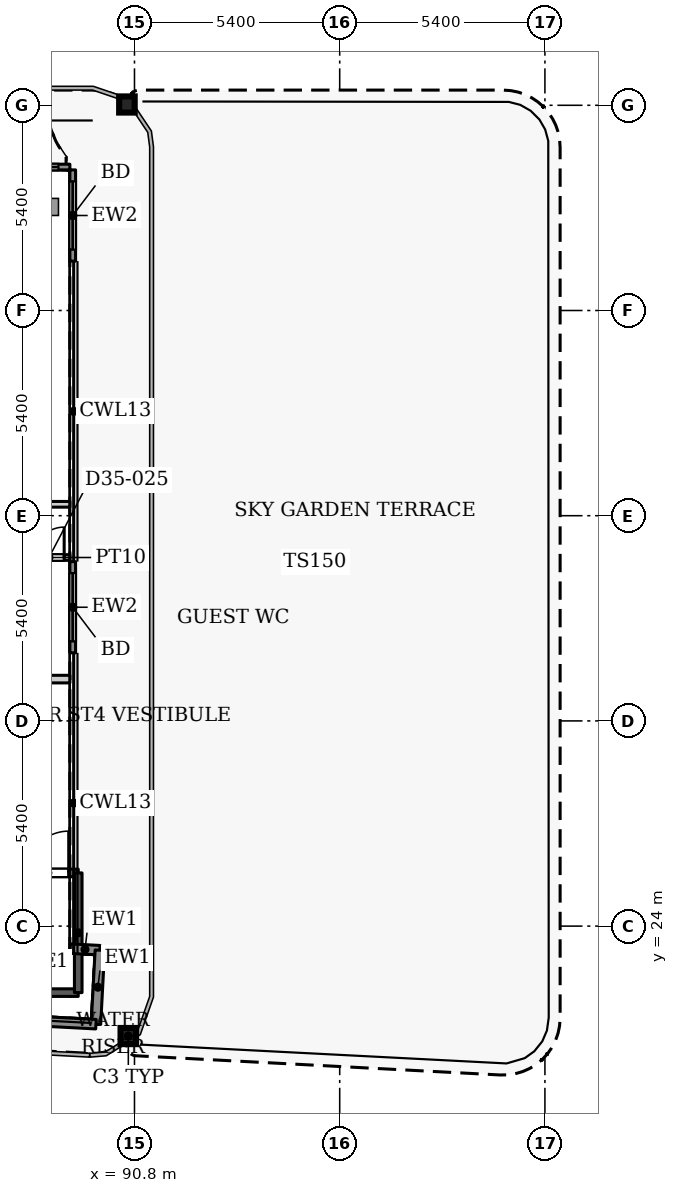
"""IFC4 building model, lengths in metres.
Left out: names, types, materials, properties, quantities, classifications, styles, units other than length and angle.
Written with IfcOpenShell. Run it as: python <this file> out.ifc"""

import sys

from ifc_helpers import new_model, si_unit, direction, frame, frame_2d, origin, origin_2d, place, context, subcontext, project, spatial, rectangle, i_section, extrude, source, transform, mapped, element, fill, save


model = new_model("IFC4")
c1 = context("Model", 3, precision=1e-05, world=origin(), true_north=direction((0.0, 1.0)))
c2 = subcontext(c1, "Body", "Model", "MODEL_VIEW")
j1 = project(units=[si_unit("LENGTHUNIT", "METRE"), si_unit("PLANEANGLEUNIT", "RADIAN")], contexts=[c1])
p1 = place(None, origin())
s1 = spatial("IfcSite", under=j1, at=p1, CompositionType="ELEMENT")
p2 = place(p1, origin())
s2 = spatial("IfcBuilding", under=s1, at=p2, CompositionType="ELEMENT")
p3 = place(p2, frame((0.0, 0.0, 152.6)))
s3 = spatial("IfcBuildingStorey", under=s2, at=p3, CompositionType="ELEMENT", Elevation=152.6)
for number, where, z_axis, x_axis in (
    (1, (90.638, 21.107, 0.0), (0.0, 0.0, 1.0), (1.0, 0.0, 0.0)),
    (2, (90.601, 45.621, 0.0), (0.0, 0.0, 1.0), (1.0, 0.0, 0.0)),
):
    element("IfcColumn", number, at=place(p3, frame(where, z_axis=z_axis, x_axis=x_axis)), inside=s3, PredefinedType="COLUMN", context=c2, shape_type="SweptSolid", body=[
        extrude(i_section(OverallWidth=0.409, OverallDepth=0.425, WebThickness=0.033, FlangeThickness=0.052, FilletRadius=0.013, at=origin_2d()), origin(), (0.0, 0.0, 1.0), 3.9),
    ])
p4 = place(p3, frame((86.7, 43.975, 0.0), z_axis=(0.0, 0.0, 1.0), x_axis=(1.0, 0.0, 0.0)))
e3 = element("IfcWall", 3, at=p4, inside=s3, PredefinedType="SOLIDWALL", context=c2, shape_type="SweptSolid", body=[
    extrude(rectangle(XDim=2.4, YDim=0.15, at=frame_2d((1.2, 0.0))), origin(), (0.0, 0.0, 1.0), 3.75),
])
p5 = place(p4, frame((0.3, 0.0, 0.0)))
e4 = element("IfcOpeningElement", 4, at=p5, cuts=e3, PredefinedType="OPENING", context=c2, shape_type="SweptSolid", body=[
    extrude(rectangle(XDim=1.8, YDim=2.4, at=frame_2d((0.9, 1.2))), frame((0.0, 0.085, 0.0), z_axis=(0.0, -1.0, 0.0), x_axis=(1.0, 0.0, 0.0)), (0.0, 0.0, 1.0), 0.17),
])
p6 = place(p3, frame((89.175, 43.9, 0.0), z_axis=(0.0, 0.0, 1.0), x_axis=(0.0, -1.0, 0.0)))
e5 = element("IfcWall", 5, at=p6, inside=s3, PredefinedType="SOLIDWALL", context=c2, shape_type="SweptSolid", body=[
    extrude(rectangle(XDim=2.4, YDim=0.15, at=frame_2d((1.2, 0.0))), origin(), (0.0, 0.0, 1.0), 3.75),
])
p7 = place(p6, frame((0.3, 0.0, 0.0)))
e6 = element("IfcOpeningElement", 6, at=p7, cuts=e5, PredefinedType="OPENING", context=c2, shape_type="SweptSolid", body=[
    extrude(rectangle(XDim=1.8, YDim=2.4, at=frame_2d((0.9, 1.2))), frame((0.0, 0.085, 0.0), z_axis=(0.0, -1.0, 0.0), x_axis=(1.0, 0.0, 0.0)), (0.0, 0.0, 1.0), 0.17),
])
p8 = place(p3, frame((89.175, 33.591, 0.0), z_axis=(0.0, 0.0, 1.0), x_axis=(0.0, -1.0, 0.0)))
e7 = element("IfcWall", 7, at=p8, inside=s3, PredefinedType="SOLIDWALL", context=c2, shape_type="SweptSolid", body=[
    extrude(rectangle(XDim=2.4, YDim=0.15, at=frame_2d((1.2, 0.0))), origin(), (0.0, 0.0, 1.0), 3.75),
])
p9 = place(p8, frame((0.3, 0.0, 0.0)))
e8 = element("IfcOpeningElement", 8, at=p9, cuts=e7, PredefinedType="OPENING", context=c2, shape_type="SweptSolid", body=[
    extrude(rectangle(XDim=1.8, YDim=2.4, at=frame_2d((0.9, 1.2))), frame((0.0, 0.085, 0.0), z_axis=(0.0, -1.0, 0.0), x_axis=(1.0, 0.0, 0.0)), (0.0, 0.0, 1.0), 0.17),
])
p10 = place(p3, frame((89.107, 23.408, 0.0), z_axis=(0.0, 0.0, 1.0), x_axis=(0.998561284263, -0.053622398031, 0.0)))
e9 = element("IfcWall", 9, at=p10, inside=s3, PredefinedType="SOLIDWALL", context=c2, shape_type="SweptSolid", body=[
    extrude(rectangle(XDim=0.783, YDim=0.25, at=frame_2d((0.392, 0.0))), origin(), (0.0, 0.0, 1.0), 3.75),
])
p11 = place(p3, frame((89.889, 23.366, 0.0), z_axis=(0.0, 0.0, 1.0), x_axis=(-0.052841433274, -0.998602915542, 0.0)))
e10 = element("IfcWall", 10, at=p11, inside=s3, PredefinedType="SOLIDWALL", context=c2, shape_type="SweptSolid", body=[
    extrude(rectangle(XDim=1.95, YDim=0.25, at=frame_2d((0.975, 0.0))), origin(), (0.0, 0.0, 1.0), 3.75),
])
p12 = place(p3, frame((89.786, 21.419, 0.0), z_axis=(0.0, 0.0, 1.0), x_axis=(-0.998617793089, 0.052559521752, 0.0)))
e11 = element("IfcWall", 11, at=p12, inside=s3, PredefinedType="SOLIDWALL", context=c2, shape_type="SweptSolid", body=[
    extrude(rectangle(XDim=55.824, YDim=0.25, at=frame_2d((27.912, 0.0))), origin(), (0.0, 0.0, 1.0), 3.75),
])
p13 = place(p3, frame((80.16, 22.25, 0.0), z_axis=(0.0, 0.0, 1.0), x_axis=(1.0, 0.0, 0.0)))
e12 = element("IfcWall", 12, at=p13, inside=s3, PredefinedType="SHEAR", context=c2, shape_type="SweptSolid", body=[
    extrude(rectangle(XDim=9.16, YDim=0.2, at=frame_2d((4.58, 0.0))), origin(), (0.0, 0.0, 1.0), 3.9),
])
p14 = place(p3, frame((80.16, 25.4, 0.0), z_axis=(0.0, 0.0, 1.0), x_axis=(1.0, 0.0, 0.0)))
e13 = element("IfcWall", 13, at=p14, inside=s3, PredefinedType="SHEAR", context=c2, shape_type="SweptSolid", body=[
    extrude(rectangle(XDim=9.16, YDim=0.2, at=frame_2d((4.58, 0.0))), origin(), (0.0, 0.0, 1.0), 3.9),
])
p15 = place(p14, frame((7.81, 0.0, 0.0)))
e14 = element("IfcOpeningElement", 14, at=p15, cuts=e13, PredefinedType="OPENING", context=c2, shape_type="SweptSolid", body=[
    extrude(rectangle(XDim=1.1, YDim=2.2, at=frame_2d((0.55, 1.1))), frame((0.0, 0.11, 0.0), z_axis=(0.0, -1.0, 0.0), x_axis=(1.0, 0.0, 0.0)), (0.0, 0.0, 1.0), 0.22),
])
p16 = place(p3, frame((89.32, 22.25, 0.0), z_axis=(0.0, 0.0, 1.0), x_axis=(0.0, 1.0, 0.0)))
e15 = element("IfcWall", 15, at=p16, inside=s3, PredefinedType="SHEAR", context=c2, shape_type="SweptSolid", body=[
    extrude(rectangle(XDim=3.15, YDim=0.2, at=frame_2d((1.575, 0.0))), origin(), (0.0, 0.0, 1.0), 3.9),
])
p17 = place(p3, frame((53.549, 30.5, 0.0), z_axis=(0.0, 0.0, 1.0), x_axis=(1.0, 0.0, 0.0)))
e16 = element("IfcWall", 16, at=p17, inside=s3, PredefinedType="PARTITIONING", context=c2, shape_type="SweptSolid", body=[
    extrude(rectangle(XDim=35.551, YDim=0.2, at=frame_2d((17.775, 0.0))), origin(), (0.0, 0.0, 1.0), 3.6),
])
p18 = place(p17, frame((0.251, 0.0, 0.0)))
e17 = element("IfcOpeningElement", 17, at=p18, cuts=e16, PredefinedType="OPENING", context=c2, shape_type="SweptSolid", body=[
    extrude(rectangle(XDim=1.0, YDim=2.1, at=frame_2d((0.5, 1.05))), frame((0.0, 0.11, 0.0), z_axis=(0.0, -1.0, 0.0), x_axis=(1.0, 0.0, 0.0)), (0.0, 0.0, 1.0), 0.22),
])
p19 = place(p17, frame((21.701, 0.0, 0.0)))
e18 = element("IfcOpeningElement", 18, at=p19, cuts=e16, PredefinedType="OPENING", context=c2, shape_type="SweptSolid", body=[
    extrude(rectangle(XDim=1.0, YDim=2.1, at=frame_2d((0.5, 1.05))), frame((0.0, 0.11, 0.0), z_axis=(0.0, -1.0, 0.0), x_axis=(1.0, 0.0, 0.0)), (0.0, 0.0, 1.0), 0.22),
])
p20 = place(p17, frame((32.201, 0.0, 0.0)))
e19 = element("IfcOpeningElement", 19, at=p20, cuts=e16, PredefinedType="OPENING", context=c2, shape_type="SweptSolid", body=[
    extrude(rectangle(XDim=1.0, YDim=2.1, at=frame_2d((0.5, 1.05))), frame((0.0, 0.11, 0.0), z_axis=(0.0, -1.0, 0.0), x_axis=(1.0, 0.0, 0.0)), (0.0, 0.0, 1.0), 0.22),
])
p21 = place(p3, frame((76.9, 35.1, 0.0), z_axis=(0.0, 0.0, 1.0), x_axis=(1.0, 0.0, 0.0)))
e20 = element("IfcWall", 20, at=p21, inside=s3, PredefinedType="PARTITIONING", context=c2, shape_type="SweptSolid", body=[
    extrude(rectangle(XDim=12.2, YDim=0.15, at=frame_2d((6.1, 0.0))), origin(), (0.0, 0.0, 1.0), 3.6),
])
p22 = place(p21, frame((6.2, 0.0, 0.0)))
e21 = element("IfcOpeningElement", 21, at=p22, cuts=e20, PredefinedType="OPENING", context=c2, shape_type="SweptSolid", body=[
    extrude(rectangle(XDim=0.9, YDim=2.1, at=frame_2d((0.45, 1.05))), frame((0.0, 0.085, 0.0), z_axis=(0.0, -1.0, 0.0), x_axis=(1.0, 0.0, 0.0)), (0.0, 0.0, 1.0), 0.17),
])
p23 = place(p21, frame((9.6, 0.0, 0.0)))
e22 = element("IfcOpeningElement", 22, at=p23, cuts=e20, PredefinedType="OPENING", context=c2, shape_type="SweptSolid", body=[
    extrude(rectangle(XDim=1.0, YDim=2.1, at=frame_2d((0.5, 1.05))), frame((0.0, 0.085, 0.0), z_axis=(0.0, -1.0, 0.0), x_axis=(1.0, 0.0, 0.0)), (0.0, 0.0, 1.0), 0.17),
])
p24 = place(p21, frame((3.2, 0.0, 0.0)))
e23 = element("IfcOpeningElement", 23, at=p24, cuts=e20, PredefinedType="OPENING", context=c2, shape_type="SweptSolid", body=[
    extrude(rectangle(XDim=0.9, YDim=2.1, at=frame_2d((0.45, 1.05))), frame((0.0, 0.085, 0.0), z_axis=(0.0, -1.0, 0.0), x_axis=(1.0, 0.0, 0.0)), (0.0, 0.0, 1.0), 0.17),
])
p25 = place(p3, frame((87.375, 33.7, 0.0), z_axis=(0.0, 0.0, 1.0), x_axis=(1.0, 0.0, 0.0)))
e24 = element("IfcWall", 24, at=p25, inside=s3, PredefinedType="PARTITIONING", context=c2, shape_type="SweptSolid", body=[
    extrude(rectangle(XDim=1.725, YDim=0.15, at=frame_2d((0.863, 0.0))), origin(), (0.0, 0.0, 1.0), 3.6),
])
p26 = place(p25, frame((0.775, 0.0, 0.0)))
e25 = element("IfcOpeningElement", 25, at=p26, cuts=e24, PredefinedType="OPENING", context=c2, shape_type="SweptSolid", body=[
    extrude(rectangle(XDim=0.8, YDim=2.1, at=frame_2d((0.4, 1.05))), frame((0.0, 0.085, 0.0), z_axis=(0.0, -1.0, 0.0), x_axis=(1.0, 0.0, 0.0)), (0.0, 0.0, 1.0), 0.17),
])
m1 = source(origin(), c2, "Body", "SweptSolid", [
    extrude(rectangle(XDim=1.8, YDim=2.4, at=frame_2d((0.9, 1.2))), frame((0.0, 0.025, 0.0), z_axis=(0.0, -1.0, 0.0), x_axis=(1.0, 0.0, 0.0)), (0.0, 0.0, 1.0), 0.05),
])
p27 = place(p5, origin())
e26 = element("IfcDoor", 26, at=p27, inside=s3, OperationType="SLIDING_TO_LEFT", PredefinedType="DOOR", context=c2, shape_type="MappedRepresentation", body=[
    mapped(m1, transform((0.0, 0.0, 0.0), x_axis=(1.0, 0.0, 0.0), y_axis=(0.0, 1.0, 0.0), z_axis=(0.0, 0.0, 1.0), scale=1.0)),
])
fill(e4, e26)
p28 = place(p7, origin())
e27 = element("IfcDoor", 27, at=p28, inside=s3, OperationType="SLIDING_TO_LEFT", PredefinedType="DOOR", context=c2, shape_type="MappedRepresentation", body=[
    mapped(m1, transform((0.0, 0.0, 0.0), x_axis=(1.0, 0.0, 0.0), y_axis=(0.0, 1.0, 0.0), z_axis=(0.0, 0.0, 1.0), scale=1.0)),
])
fill(e6, e27)
p29 = place(p9, origin())
e28 = element("IfcDoor", 28, at=p29, inside=s3, OperationType="SLIDING_TO_LEFT", PredefinedType="DOOR", context=c2, shape_type="MappedRepresentation", body=[
    mapped(m1, transform((0.0, 0.0, 0.0), x_axis=(1.0, 0.0, 0.0), y_axis=(0.0, 1.0, 0.0), z_axis=(0.0, 0.0, 1.0), scale=1.0)),
])
fill(e8, e28)
m2 = source(origin(), c2, "Body", "SweptSolid", [
    extrude(rectangle(XDim=1.1, YDim=2.2, at=frame_2d((0.55, 1.1))), frame((0.0, 0.025, 0.0), z_axis=(0.0, -1.0, 0.0), x_axis=(1.0, 0.0, 0.0)), (0.0, 0.0, 1.0), 0.05),
])
p30 = place(p15, origin())
e29 = element("IfcDoor", 29, at=p30, inside=s3, OperationType="SINGLE_SWING_LEFT", PredefinedType="DOOR", context=c2, shape_type="MappedRepresentation", body=[
    mapped(m2, transform((0.0, 0.0, 0.0), x_axis=(1.0, 0.0, 0.0), y_axis=(0.0, 1.0, 0.0), z_axis=(0.0, 0.0, 1.0), scale=1.0)),
])
fill(e14, e29)
m3 = source(origin(), c2, "Body", "SweptSolid", [
    extrude(rectangle(XDim=0.8, YDim=2.1, at=frame_2d((0.4, 1.05))), frame((0.0, 0.025, 0.0), z_axis=(0.0, -1.0, 0.0), x_axis=(1.0, 0.0, 0.0)), (0.0, 0.0, 1.0), 0.05),
])
p31 = place(p26, origin())
e30 = element("IfcDoor", 30, at=p31, inside=s3, OperationType="SINGLE_SWING_LEFT", PredefinedType="DOOR", context=c2, shape_type="MappedRepresentation", body=[
    mapped(m3, transform((0.0, 0.0, 0.0), x_axis=(1.0, 0.0, 0.0), y_axis=(0.0, 1.0, 0.0), z_axis=(0.0, 0.0, 1.0), scale=1.0)),
])
fill(e25, e30)
save(model, sys.argv[1])
